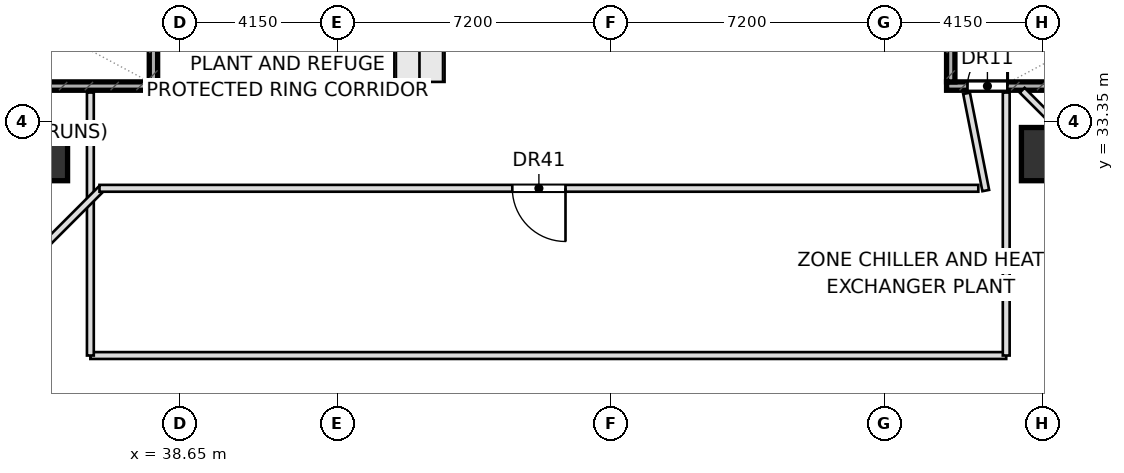
"""IFC4 building model, lengths in metres.
Left out: names, types, materials, properties, quantities, classifications, styles, units other than length and angle.
Written with IfcOpenShell. Run it as: python <this file> out.ifc"""

import sys

from ifc_helpers import new_model, si_unit, direction, frame, frame_2d, origin, origin_2d, place, context, subcontext, project, spatial, rectangle, extrude, element, fill, save


model = new_model("IFC4")
c1 = context("Model", 3, precision=1e-05, world=origin(), true_north=direction((0.0, 1.0)))
c2 = subcontext(c1, "Body", "Model", "MODEL_VIEW")
j1 = project(units=[si_unit("LENGTHUNIT", "METRE"), si_unit("PLANEANGLEUNIT", "RADIAN")], contexts=[c1])
p1 = place(None, origin())
s1 = spatial("IfcSite", under=j1, at=p1, CompositionType="ELEMENT")
p2 = place(p1, origin())
s2 = spatial("IfcBuilding", under=s1, at=p2, CompositionType="ELEMENT")
p3 = place(p2, frame((0.0, 0.0, 22.2)))
s3 = spatial("IfcBuildingStorey", under=s2, at=p3, CompositionType="ELEMENT", Elevation=22.2)
p4 = place(p3, frame((30.38, 34.29, 0.0), z_axis=(0.0, 0.0, 1.0), x_axis=(1.0, 0.0, 0.0)))
e1 = element("IfcWall", 1, at=p4, inside=s3, PredefinedType="SHEAR", context=c2, shape_type="SweptSolid", body=[
    extrude(rectangle(XDim=7.69, YDim=0.22, at=frame_2d((3.845, 0.0))), origin(), (0.0, 0.0, 1.0), 5.1),
])
p5 = place(p4, frame((0.55, 0.0, 0.0)))
e2 = element("IfcOpeningElement", 2, at=p5, cuts=e1, PredefinedType="OPENING", context=c2, shape_type="SweptSolid", body=[
    extrude(rectangle(XDim=1.05, YDim=2.2, at=frame_2d((0.525, 1.1))), frame((0.0, 0.12, 0.0), z_axis=(0.0, -1.0, 0.0), x_axis=(1.0, 0.0, 0.0)), (0.0, 0.0, 1.0), 0.24),
])
p6 = place(p3, frame((37.96, 34.4, 0.0), z_axis=(0.0, 0.0, 1.0), x_axis=(0.0, 1.0, 0.0)))
e3 = element("IfcWall", 3, at=p6, inside=s3, PredefinedType="SHEAR", context=c2, shape_type="SweptSolid", body=[
    extrude(rectangle(XDim=3.1, YDim=0.22, at=frame_2d((1.55, 0.0))), origin(), (0.0, 0.0, 1.0), 5.1),
])
p7 = place(p3, frame((58.83, 34.29, 0.0), z_axis=(0.0, 0.0, 1.0), x_axis=(1.0, 0.0, 0.0)))
e4 = element("IfcWall", 4, at=p7, inside=s3, PredefinedType="SHEAR", context=c2, shape_type="SweptSolid", body=[
    extrude(rectangle(XDim=7.69, YDim=0.22, at=frame_2d((3.845, 0.0))), origin(), (0.0, 0.0, 1.0), 5.1),
])
p8 = place(p7, frame((0.55, 0.0, 0.0)))
e5 = element("IfcOpeningElement", 5, at=p8, cuts=e4, PredefinedType="OPENING", context=c2, shape_type="SweptSolid", body=[
    extrude(rectangle(XDim=1.05, YDim=2.2, at=frame_2d((0.525, 1.1))), frame((0.0, 0.12, 0.0), z_axis=(0.0, -1.0, 0.0), x_axis=(1.0, 0.0, 0.0)), (0.0, 0.0, 1.0), 0.24),
])
p9 = place(p3, frame((58.94, 34.4, 0.0), z_axis=(0.0, 0.0, 1.0), x_axis=(0.0, 1.0, 0.0)))
e6 = element("IfcWall", 6, at=p9, inside=s3, PredefinedType="SHEAR", context=c2, shape_type="SweptSolid", body=[
    extrude(rectangle(XDim=3.1, YDim=0.22, at=frame_2d((1.55, 0.0))), origin(), (0.0, 0.0, 1.0), 5.1),
])
for number, where, z_axis, x_axis in (
    (7, (35.0, 32.5, 0.0), (0.0, 0.0, 1.0), (1.0, 0.0, 0.0)),
    (8, (61.5, 32.5, 0.0), (0.0, 0.0, 1.0), (1.0, 0.0, 0.0)),
):
    element("IfcColumn", number, at=place(p3, frame(where, z_axis=z_axis, x_axis=x_axis)), inside=s3, PredefinedType="COLUMN", context=c2, shape_type="SweptSolid", body=[
        extrude(rectangle(XDim=1.4, YDim=1.4, at=origin_2d()), origin(), (0.0, 0.0, 1.0), 5.1),
    ])
p10 = place(p3, frame((36.3, 27.2, 0.0), z_axis=(0.0, 0.0, 1.0), x_axis=(1.0, 0.0, 0.0)))
e9 = element("IfcWall", 9, at=p10, inside=s3, PredefinedType="PARTITIONING", context=c2, shape_type="SweptSolid", body=[
    extrude(rectangle(XDim=24.1, YDim=0.18, at=frame_2d((12.05, 0.0))), origin(), (0.0, 0.0, 1.0), 2.575),
])
for number, where, z_axis, x_axis in (
    (10, (60.4, 27.2, 0.0), (0.0, 0.0, 1.0), (0.0, 1.0, 0.0)),
    (11, (36.3, 27.2, 0.0), (0.0, 0.0, 1.0), (0.0, 1.0, 0.0)),
):
    element("IfcWall", number, at=place(p3, frame(where, z_axis=z_axis, x_axis=x_axis)), inside=s3, PredefinedType="PARTITIONING", context=c2, shape_type="SweptSolid", body=[
        extrude(rectangle(XDim=6.92, YDim=0.18, at=frame_2d((3.46, 0.0))), origin(), (0.0, 0.0, 1.0), 2.575),
    ])
p11 = place(p3, frame((36.6, 31.6, 0.0), z_axis=(0.0, 0.0, 1.0), x_axis=(-0.707106781187, -0.707106781187, 0.0)))
e12 = element("IfcWall", 12, at=p11, inside=s3, PredefinedType="PARTITIONING", context=c2, shape_type="SweptSolid", body=[
    extrude(rectangle(XDim=9.935, YDim=0.18, at=frame_2d((4.968, 0.0))), origin(), (0.0, 0.0, 1.0), 2.575),
])
p12 = place(p3, frame((60.82, 34.18, 0.0), z_axis=(0.0, 0.0, 1.0), x_axis=(0.707106781187, -0.707106781187, 0.0)))
e13 = element("IfcWall", 13, at=p12, inside=s3, PredefinedType="PARTITIONING", context=c2, shape_type="SweptSolid", body=[
    extrude(rectangle(XDim=13.583, YDim=0.18, at=frame_2d((6.792, 0.0))), origin(), (0.0, 0.0, 1.0), 2.575),
])
p13 = place(p3, frame((59.356, 34.099, 0.0), z_axis=(0.0, 0.0, 1.0), x_axis=(0.193918813567, -0.981017580752, 0.0)))
e14 = element("IfcWall", 14, at=p13, inside=s3, PredefinedType="PARTITIONING", context=c2, shape_type="SweptSolid", body=[
    extrude(rectangle(XDim=2.607, YDim=0.18, at=frame_2d((1.304, 0.0))), origin(), (0.0, 0.0, 1.0), 2.575),
])
p14 = place(p3, frame((59.665, 31.6, 0.0), z_axis=(0.0, 0.0, 1.0), x_axis=(-1.0, 0.0, 0.0)))
e15 = element("IfcWall", 15, at=p14, inside=s3, PredefinedType="PARTITIONING", context=c2, shape_type="SweptSolid", body=[
    extrude(rectangle(XDim=23.125, YDim=0.18, at=frame_2d((11.562, 0.0))), origin(), (0.0, 0.0, 1.0), 5.1),
])
p15 = place(p14, frame((10.863, 0.0, 0.0)))
e16 = element("IfcOpeningElement", 16, at=p15, cuts=e15, PredefinedType="OPENING", context=c2, shape_type="SweptSolid", body=[
    extrude(rectangle(XDim=1.4, YDim=2.15, at=frame_2d((0.7, 1.075))), frame((0.0, 0.1, 0.0), z_axis=(0.0, -1.0, 0.0), x_axis=(1.0, 0.0, 0.0)), (0.0, 0.0, 1.0), 0.2),
])
p16 = place(p8, origin())
e17 = element("IfcDoor", 17, at=p16, inside=s3, OperationType="SINGLE_SWING_RIGHT", PredefinedType="DOOR", context=c2, shape_type="SweptSolid", body=[
    extrude(rectangle(XDim=1.05, YDim=2.2, at=frame_2d((0.525, 1.1))), frame((0.0, 0.025, 0.0), z_axis=(0.0, -1.0, 0.0), x_axis=(1.0, 0.0, 0.0)), (0.0, 0.0, 1.0), 0.05),
])
fill(e5, e17)
p17 = place(p15, origin())
e18 = element("IfcDoor", 18, at=p17, inside=s3, OperationType="SINGLE_SWING_LEFT", PredefinedType="DOOR", context=c2, shape_type="SweptSolid", body=[
    extrude(rectangle(XDim=1.4, YDim=2.15, at=frame_2d((0.7, 1.075))), frame((0.0, 0.025, 0.0), z_axis=(0.0, -1.0, 0.0), x_axis=(1.0, 0.0, 0.0)), (0.0, 0.0, 1.0), 0.05),
])
fill(e16, e18)
save(model, sys.argv[1])
